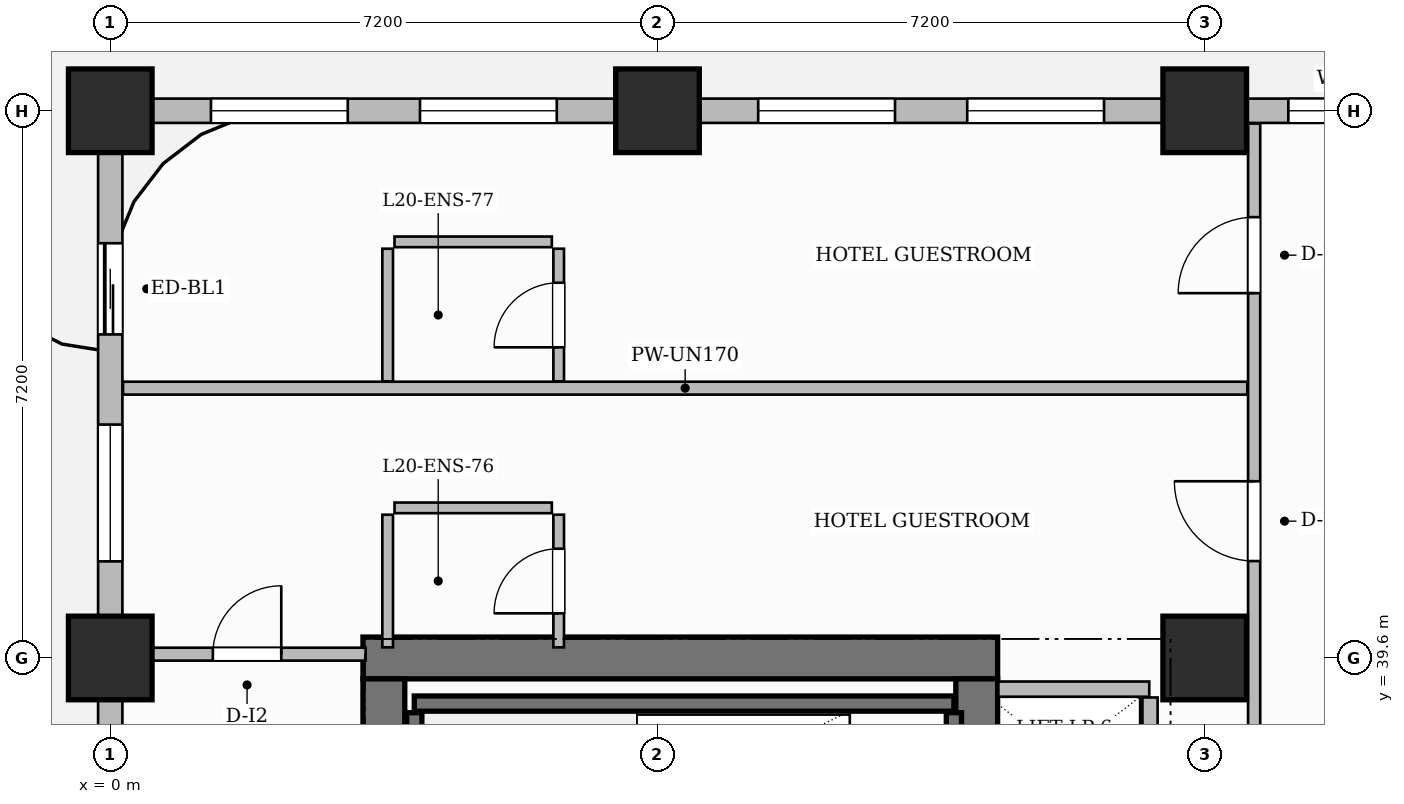
"""IFC4 building model, lengths in metres.
Left out: names, types, materials, properties, quantities, classifications, styles, units other than length and angle.
Written with IfcOpenShell. Run it as: python <this file> out.ifc"""

import sys

from ifc_helpers import new_model, si_unit, direction, frame, frame_2d, origin, origin_2d, place, context, subcontext, project, spatial, rectangle, extrude, source, transform, mapped, element, fill, save


model = new_model("IFC4")
c1 = context("Model", 3, precision=1e-05, world=origin(), true_north=direction((0.0, 1.0)))
c2 = subcontext(c1, "Body", "Model", "MODEL_VIEW")
j1 = project(units=[si_unit("LENGTHUNIT", "METRE"), si_unit("PLANEANGLEUNIT", "RADIAN")], contexts=[c1])
p1 = place(None, origin())
s1 = spatial("IfcSite", under=j1, at=p1, CompositionType="ELEMENT")
p2 = place(p1, origin())
s2 = spatial("IfcBuilding", under=s1, at=p2, CompositionType="ELEMENT")
p3 = place(p2, frame((0.0, 0.0, 84.2)))
s3 = spatial("IfcBuildingStorey", under=s2, at=p3, CompositionType="ELEMENT", Elevation=84.2)
p4 = place(p3, frame((3.325, 39.6, 0.0), z_axis=(0.0, 0.0, 1.0), x_axis=(1.0, 0.0, 0.0)))
e1 = element("IfcWall", 1, at=p4, inside=s3, PredefinedType="SHEAR", context=c2, shape_type="SweptSolid", body=[
    extrude(rectangle(XDim=8.35, YDim=0.55, at=frame_2d((4.175, 0.0))), origin(), (0.0, 0.0, 1.0), 3.7),
])
p5 = place(p3, frame((3.6, 25.475, 0.0), z_axis=(0.0, 0.0, 1.0), x_axis=(0.0, 1.0, 0.0)))
e2 = element("IfcWall", 2, at=p5, inside=s3, PredefinedType="SHEAR", context=c2, shape_type="SweptSolid", body=[
    extrude(rectangle(XDim=13.85, YDim=0.55, at=frame_2d((6.925, 0.0))), origin(), (0.0, 0.0, 1.0), 3.7),
])
p6 = place(p3, frame((11.4, 25.475, 0.0), z_axis=(0.0, 0.0, 1.0), x_axis=(0.0, 1.0, 0.0)))
e3 = element("IfcWall", 3, at=p6, inside=s3, PredefinedType="SHEAR", context=c2, shape_type="SweptSolid", body=[
    extrude(rectangle(XDim=13.85, YDim=0.55, at=frame_2d((6.925, 0.0))), origin(), (0.0, 0.0, 1.0), 3.7),
])
p7 = place(p6, frame((6.495, 0.0, 0.0)))
e4 = element("IfcOpeningElement", 4, at=p7, cuts=e3, PredefinedType="OPENING", context=c2, shape_type="SweptSolid", body=[
    extrude(rectangle(XDim=1.5, YDim=2.2, at=frame_2d((0.75, 1.1))), frame((0.0, 0.285, 0.0), z_axis=(0.0, -1.0, 0.0), x_axis=(1.0, 0.0, 0.0)), (0.0, 0.0, 1.0), 0.57),
])
m1 = source(origin(), c2, "Body", "SweptSolid", [
    extrude(rectangle(XDim=1.1, YDim=1.1, at=origin_2d()), origin(), (0.0, 0.0, 1.0), 3.7),
])
for number, where, z_axis, x_axis in (
    (5, (0.0, 39.6, 0.0), (0.0, 0.0, 1.0), (1.0, 0.0, 0.0)),
    (6, (0.0, 46.8, 0.0), (0.0, 0.0, 1.0), (1.0, 0.0, 0.0)),
    (7, (7.2, 46.8, 0.0), (0.0, 0.0, 1.0), (1.0, 0.0, 0.0)),
    (8, (14.4, 39.6, 0.0), (0.0, 0.0, 1.0), (1.0, 0.0, 0.0)),
    (9, (14.4, 46.8, 0.0), (0.0, 0.0, 1.0), (1.0, 0.0, 0.0)),
):
    element("IfcColumn", number, at=place(p3, frame(where, z_axis=z_axis, x_axis=x_axis)), inside=s3, PredefinedType="COLUMN", context=c2, shape_type="MappedRepresentation", body=[
        mapped(m1, transform((0.0, 0.0, 0.0), scale=1.0)),
    ])
p8 = place(p3, frame((4.0, 39.0, 0.0), z_axis=(0.0, 0.0, 1.0), x_axis=(1.0, 0.0, 0.0)))
e10 = element("IfcWall", 10, at=p8, inside=s3, PredefinedType="SHEAR", context=c2, shape_type="SweptSolid", body=[
    extrude(rectangle(XDim=7.1, YDim=0.2, at=frame_2d((3.55, 0.0))), origin(), (0.0, 0.0, 1.0), 3.7),
])
for number, where, z_axis, x_axis in (
    (11, (4.0, 36.18, 0.0), (0.0, 0.0, 1.0), (0.0, 1.0, 0.0)),
    (12, (11.1, 36.18, 0.0), (0.0, 0.0, 1.0), (0.0, 1.0, 0.0)),
):
    element("IfcWall", number, at=place(p3, frame(where, z_axis=z_axis, x_axis=x_axis)), inside=s3, PredefinedType="SHEAR", context=c2, shape_type="SweptSolid", body=[
        extrude(rectangle(XDim=2.7, YDim=0.2, at=frame_2d((1.35, 0.0))), origin(), (0.0, 0.0, 1.0), 3.7),
    ])
p9 = place(p3, frame((11.685, 39.19, 0.0), z_axis=(0.0, 0.0, 1.0), x_axis=(1.0, 0.0, 0.0)))
e13 = element("IfcWall", 13, at=p9, inside=s3, PredefinedType="PARTITIONING", context=c2, shape_type="SweptSolid", body=[
    extrude(rectangle(XDim=1.985, YDim=0.2, at=frame_2d((0.992, 0.0))), origin(), (0.0, 0.0, 1.0), 3.45),
])
p10 = place(p3, frame((13.68, 34.36, 0.0), z_axis=(0.0, 0.0, 1.0), x_axis=(0.0, 1.0, 0.0)))
e14 = element("IfcWall", 14, at=p10, inside=s3, PredefinedType="PARTITIONING", context=c2, shape_type="SweptSolid", body=[
    extrude(rectangle(XDim=4.72, YDim=0.2, at=frame_2d((2.36, 0.0))), origin(), (0.0, 0.0, 1.0), 3.45),
])
p11 = place(p3, frame((0.24, 39.65, 0.0), z_axis=(0.0, 0.0, 1.0), x_axis=(1.0, 0.0, 0.0)))
e15 = element("IfcWall", 15, at=p11, inside=s3, PredefinedType="PARTITIONING", context=c2, shape_type="SweptSolid", body=[
    extrude(rectangle(XDim=3.12, YDim=0.17, at=frame_2d((1.56, 0.0))), origin(), (0.0, 0.0, 1.0), 3.45),
])
p12 = place(p11, frame((1.11, 0.0, 0.0)))
e16 = element("IfcOpeningElement", 16, at=p12, cuts=e15, PredefinedType="OPENING", context=c2, shape_type="SweptSolid", body=[
    extrude(rectangle(XDim=0.9, YDim=2.15, at=frame_2d((0.45, 1.075))), frame((0.0, 0.095, 0.0), z_axis=(0.0, -1.0, 0.0), x_axis=(1.0, 0.0, 0.0)), (0.0, 0.0, 1.0), 0.19),
])
p13 = place(p3, frame((15.05, 34.34, 0.0), z_axis=(0.0, 0.0, 1.0), x_axis=(0.0, 1.0, 0.0)))
e17 = element("IfcWall", 17, at=p13, inside=s3, PredefinedType="PARTITIONING", context=c2, shape_type="SweptSolid", body=[
    extrude(rectangle(XDim=12.292, YDim=0.16, at=frame_2d((6.146, 0.0))), origin(), (0.0, 0.0, 1.0), 3.45),
])
p14 = place(p13, frame((6.535, 0.0, 0.0)))
e18 = element("IfcOpeningElement", 18, at=p14, cuts=e17, PredefinedType="OPENING", context=c2, shape_type="SweptSolid", body=[
    extrude(rectangle(XDim=1.05, YDim=2.25, at=frame_2d((0.525, 1.125))), frame((0.0, 0.09, 0.0), z_axis=(0.0, -1.0, 0.0), x_axis=(1.0, 0.0, 0.0)), (0.0, 0.0, 1.0), 0.18),
])
p15 = place(p13, frame((10.06, 0.0, 0.0)))
e19 = element("IfcOpeningElement", 19, at=p15, cuts=e17, PredefinedType="OPENING", context=c2, shape_type="SweptSolid", body=[
    extrude(rectangle(XDim=1.0, YDim=2.2, at=frame_2d((0.5, 1.1))), frame((0.0, 0.09, 0.0), z_axis=(0.0, -1.0, 0.0), x_axis=(1.0, 0.0, 0.0)), (0.0, 0.0, 1.0), 0.18),
])
p16 = place(p3, frame((0.168, 43.15, 0.0), z_axis=(0.0, 0.0, 1.0), x_axis=(1.0, 0.0, 0.0)))
e20 = element("IfcWall", 20, at=p16, inside=s3, PredefinedType="PARTITIONING", context=c2, shape_type="SweptSolid", body=[
    extrude(rectangle(XDim=14.792, YDim=0.17, at=frame_2d((7.396, 0.0))), origin(), (0.0, 0.0, 1.0), 3.45),
])
p17 = place(p3, frame((3.65, 39.74, 0.0), z_axis=(0.0, 0.0, 1.0), x_axis=(0.0, 1.0, 0.0)))
e21 = element("IfcWall", 21, at=p17, inside=s3, PredefinedType="PARTITIONING", context=c2, shape_type="SweptSolid", body=[
    extrude(rectangle(XDim=1.745, YDim=0.14, at=frame_2d((0.873, 0.0))), origin(), (0.0, 0.0, 1.0), 3.45),
])
p18 = place(p3, frame((3.74, 41.575, 0.0), z_axis=(0.0, 0.0, 1.0), x_axis=(1.0, 0.0, 0.0)))
e22 = element("IfcWall", 22, at=p18, inside=s3, PredefinedType="PARTITIONING", context=c2, shape_type="SweptSolid", body=[
    extrude(rectangle(XDim=2.07, YDim=0.14, at=frame_2d((1.035, 0.0))), origin(), (0.0, 0.0, 1.0), 2.885),
])
p19 = place(p3, frame((5.9, 39.74, 0.0), z_axis=(0.0, 0.0, 1.0), x_axis=(0.0, 1.0, 0.0)))
e23 = element("IfcWall", 23, at=p19, inside=s3, PredefinedType="PARTITIONING", context=c2, shape_type="SweptSolid", body=[
    extrude(rectangle(XDim=1.745, YDim=0.14, at=frame_2d((0.873, 0.0))), origin(), (0.0, 0.0, 1.0), 3.45),
])
p20 = place(p19, frame((0.448, 0.0, 0.0)))
e24 = element("IfcOpeningElement", 24, at=p20, cuts=e23, PredefinedType="OPENING", context=c2, shape_type="SweptSolid", body=[
    extrude(rectangle(XDim=0.85, YDim=2.1, at=frame_2d((0.425, 1.05))), frame((0.0, 0.08, 0.0), z_axis=(0.0, -1.0, 0.0), x_axis=(1.0, 0.0, 0.0)), (0.0, 0.0, 1.0), 0.16),
])
p21 = place(p3, frame((3.65, 43.24, 0.0), z_axis=(0.0, 0.0, 1.0), x_axis=(0.0, 1.0, 0.0)))
e25 = element("IfcWall", 25, at=p21, inside=s3, PredefinedType="PARTITIONING", context=c2, shape_type="SweptSolid", body=[
    extrude(rectangle(XDim=1.745, YDim=0.14, at=frame_2d((0.873, 0.0))), origin(), (0.0, 0.0, 1.0), 3.45),
])
p22 = place(p3, frame((3.74, 45.075, 0.0), z_axis=(0.0, 0.0, 1.0), x_axis=(1.0, 0.0, 0.0)))
e26 = element("IfcWall", 26, at=p22, inside=s3, PredefinedType="PARTITIONING", context=c2, shape_type="SweptSolid", body=[
    extrude(rectangle(XDim=2.07, YDim=0.14, at=frame_2d((1.035, 0.0))), origin(), (0.0, 0.0, 1.0), 3.45),
])
p23 = place(p3, frame((5.9, 43.24, 0.0), z_axis=(0.0, 0.0, 1.0), x_axis=(0.0, 1.0, 0.0)))
e27 = element("IfcWall", 27, at=p23, inside=s3, PredefinedType="PARTITIONING", context=c2, shape_type="SweptSolid", body=[
    extrude(rectangle(XDim=1.745, YDim=0.14, at=frame_2d((0.873, 0.0))), origin(), (0.0, 0.0, 1.0), 3.45),
])
p24 = place(p23, frame((0.448, 0.0, 0.0)))
e28 = element("IfcOpeningElement", 28, at=p24, cuts=e27, PredefinedType="OPENING", context=c2, shape_type="SweptSolid", body=[
    extrude(rectangle(XDim=0.85, YDim=2.1, at=frame_2d((0.425, 1.05))), frame((0.0, 0.08, 0.0), z_axis=(0.0, -1.0, 0.0), x_axis=(1.0, 0.0, 0.0)), (0.0, 0.0, 1.0), 0.16),
])
p25 = place(p3, frame((0.0, 25.25, 0.0), z_axis=(0.0, 0.0, 1.0), x_axis=(0.0, 1.0, 0.0)))
e29 = element("IfcWall", 29, at=p25, inside=s3, PredefinedType="SOLIDWALL", context=c2, shape_type="SweptSolid", body=[
    extrude(rectangle(XDim=21.5, YDim=0.32, at=frame_2d((10.75, 0.0))), origin(), (0.0, 0.0, 1.0), 2.885),
])
p26 = place(p25, frame((18.607, 0.0, 0.0)))
e30 = element("IfcOpeningElement", 30, at=p26, cuts=e29, PredefinedType="OPENING", context=c2, shape_type="SweptSolid", body=[
    extrude(rectangle(XDim=1.2, YDim=2.2, at=frame_2d((0.6, 1.1))), frame((0.0, 0.17, 0.0), z_axis=(0.0, -1.0, 0.0), x_axis=(1.0, 0.0, 0.0)), (0.0, 0.0, 1.0), 0.34),
])
p27 = place(p25, frame((0.8, 0.0, 0.0)))
e31 = element("IfcOpeningElement", 31, at=p27, cuts=e29, PredefinedType="OPENING", context=c2, shape_type="SweptSolid", body=[
    extrude(rectangle(XDim=1.2, YDim=2.2, at=frame_2d((0.6, 1.1))), frame((0.0, 0.17, 0.0), z_axis=(0.0, -1.0, 0.0), x_axis=(1.0, 0.0, 0.0)), (0.0, 0.0, 1.0), 0.34),
])
p28 = place(p25, frame((3.425, 0.0, 0.8)))
e32 = element("IfcOpeningElement", 32, at=p28, cuts=e29, PredefinedType="OPENING", context=c2, shape_type="SweptSolid", body=[
    extrude(rectangle(XDim=1.8, YDim=1.85, at=frame_2d((0.9, 0.925))), frame((0.0, 0.17, 0.0), z_axis=(0.0, -1.0, 0.0), x_axis=(1.0, 0.0, 0.0)), (0.0, 0.0, 1.0), 0.34),
])
p29 = place(p25, frame((8.475, 0.0, 0.8)))
e33 = element("IfcOpeningElement", 33, at=p29, cuts=e29, PredefinedType="OPENING", context=c2, shape_type="SweptSolid", body=[
    extrude(rectangle(XDim=1.8, YDim=1.85, at=frame_2d((0.9, 0.925))), frame((0.0, 0.17, 0.0), z_axis=(0.0, -1.0, 0.0), x_axis=(1.0, 0.0, 0.0)), (0.0, 0.0, 1.0), 0.34),
])
p30 = place(p25, frame((11.225, 0.0, 0.8)))
e34 = element("IfcOpeningElement", 34, at=p30, cuts=e29, PredefinedType="OPENING", context=c2, shape_type="SweptSolid", body=[
    extrude(rectangle(XDim=1.8, YDim=1.85, at=frame_2d((0.9, 0.925))), frame((0.0, 0.17, 0.0), z_axis=(0.0, -1.0, 0.0), x_axis=(1.0, 0.0, 0.0)), (0.0, 0.0, 1.0), 0.34),
])
p31 = place(p25, frame((15.621, 0.0, 0.8)))
e35 = element("IfcOpeningElement", 35, at=p31, cuts=e29, PredefinedType="OPENING", context=c2, shape_type="SweptSolid", body=[
    extrude(rectangle(XDim=1.8, YDim=1.85, at=frame_2d((0.9, 0.925))), frame((0.0, 0.17, 0.0), z_axis=(0.0, -1.0, 0.0), x_axis=(1.0, 0.0, 0.0)), (0.0, 0.0, 1.0), 0.34),
])
p32 = place(p3, frame((0.0, 46.8, 0.0), z_axis=(0.0, 0.0, 1.0), x_axis=(1.0, 0.0, 0.0)))
e36 = element("IfcWall", 36, at=p32, inside=s3, PredefinedType="SOLIDWALL", context=c2, shape_type="SweptSolid", body=[
    extrude(rectangle(XDim=18.0, YDim=0.32, at=frame_2d((9.0, 0.0))), origin(), (0.0, 0.0, 1.0), 2.885),
])
p33 = place(p32, frame((1.325, 0.0, 0.8)))
e37 = element("IfcOpeningElement", 37, at=p33, cuts=e36, PredefinedType="OPENING", context=c2, shape_type="SweptSolid", body=[
    extrude(rectangle(XDim=1.8, YDim=1.85, at=frame_2d((0.9, 0.925))), frame((0.0, 0.17, 0.0), z_axis=(0.0, -1.0, 0.0), x_axis=(1.0, 0.0, 0.0)), (0.0, 0.0, 1.0), 0.34),
])
p34 = place(p32, frame((4.075, 0.0, 0.8)))
e38 = element("IfcOpeningElement", 38, at=p34, cuts=e36, PredefinedType="OPENING", context=c2, shape_type="SweptSolid", body=[
    extrude(rectangle(XDim=1.8, YDim=1.85, at=frame_2d((0.9, 0.925))), frame((0.0, 0.17, 0.0), z_axis=(0.0, -1.0, 0.0), x_axis=(1.0, 0.0, 0.0)), (0.0, 0.0, 1.0), 0.34),
])
p35 = place(p32, frame((8.525, 0.0, 0.8)))
e39 = element("IfcOpeningElement", 39, at=p35, cuts=e36, PredefinedType="OPENING", context=c2, shape_type="SweptSolid", body=[
    extrude(rectangle(XDim=1.8, YDim=1.85, at=frame_2d((0.9, 0.925))), frame((0.0, 0.17, 0.0), z_axis=(0.0, -1.0, 0.0), x_axis=(1.0, 0.0, 0.0)), (0.0, 0.0, 1.0), 0.34),
])
p36 = place(p32, frame((11.275, 0.0, 0.8)))
e40 = element("IfcOpeningElement", 40, at=p36, cuts=e36, PredefinedType="OPENING", context=c2, shape_type="SweptSolid", body=[
    extrude(rectangle(XDim=1.8, YDim=1.85, at=frame_2d((0.9, 0.925))), frame((0.0, 0.17, 0.0), z_axis=(0.0, -1.0, 0.0), x_axis=(1.0, 0.0, 0.0)), (0.0, 0.0, 1.0), 0.34),
])
p37 = place(p32, frame((15.5, 0.0, 0.8)))
e41 = element("IfcOpeningElement", 41, at=p37, cuts=e36, PredefinedType="OPENING", context=c2, shape_type="SweptSolid", body=[
    extrude(rectangle(XDim=1.4, YDim=1.85, at=frame_2d((0.7, 0.925))), frame((0.0, 0.17, 0.0), z_axis=(0.0, -1.0, 0.0), x_axis=(1.0, 0.0, 0.0)), (0.0, 0.0, 1.0), 0.34),
])
m2 = source(origin(), c2, "Body", "SweptSolid", [
    extrude(rectangle(XDim=0.9, YDim=2.15, at=frame_2d((0.45, 1.075))), frame((0.0, 0.025, 0.0), z_axis=(0.0, -1.0, 0.0), x_axis=(1.0, 0.0, 0.0)), (0.0, 0.0, 1.0), 0.05),
])
p38 = place(p12, origin())
e42 = element("IfcDoor", 42, at=p38, inside=s3, OperationType="SINGLE_SWING_RIGHT", PredefinedType="DOOR", context=c2, shape_type="MappedRepresentation", body=[
    mapped(m2, transform((0.0, 0.0, 0.0), scale=1.0)),
])
fill(e16, e42)
m3 = source(origin(), c2, "Body", "SweptSolid", [
    extrude(rectangle(XDim=0.85, YDim=2.1, at=frame_2d((0.425, 1.05))), frame((0.0, 0.025, 0.0), z_axis=(0.0, -1.0, 0.0), x_axis=(1.0, 0.0, 0.0)), (0.0, 0.0, 1.0), 0.05),
])
p39 = place(p20, origin())
e43 = element("IfcDoor", 43, at=p39, inside=s3, OperationType="SINGLE_SWING_LEFT", PredefinedType="DOOR", context=c2, shape_type="MappedRepresentation", body=[
    mapped(m3, transform((0.0, 0.0, 0.0), scale=1.0)),
])
fill(e24, e43)
m4 = source(origin(), c2, "Body", "SweptSolid", [
    extrude(rectangle(XDim=1.05, YDim=2.25, at=frame_2d((0.525, 1.125))), frame((0.0, 0.025, 0.0), z_axis=(0.0, -1.0, 0.0), x_axis=(1.0, 0.0, 0.0)), (0.0, 0.0, 1.0), 0.05),
])
p40 = place(p14, origin())
e44 = element("IfcDoor", 44, at=p40, inside=s3, OperationType="SINGLE_SWING_RIGHT", PredefinedType="DOOR", context=c2, shape_type="MappedRepresentation", body=[
    mapped(m4, transform((0.0, 0.0, 0.0), scale=1.0)),
])
fill(e18, e44)
p41 = place(p24, origin())
e45 = element("IfcDoor", 45, at=p41, inside=s3, OperationType="SINGLE_SWING_LEFT", PredefinedType="DOOR", context=c2, shape_type="MappedRepresentation", body=[
    mapped(m3, transform((0.0, 0.0, 0.0), scale=1.0)),
])
fill(e28, e45)
m5 = source(origin(), c2, "Body", "SweptSolid", [
    extrude(rectangle(XDim=1.0, YDim=2.2, at=frame_2d((0.5, 1.1))), frame((0.0, 0.025, 0.0), z_axis=(0.0, -1.0, 0.0), x_axis=(1.0, 0.0, 0.0)), (0.0, 0.0, 1.0), 0.05),
])
p42 = place(p15, origin())
e46 = element("IfcDoor", 46, at=p42, inside=s3, OperationType="SINGLE_SWING_LEFT", PredefinedType="DOOR", context=c2, shape_type="MappedRepresentation", body=[
    mapped(m5, transform((0.0, 0.0, 0.0), scale=1.0)),
])
fill(e19, e46)
m6 = source(origin(), c2, "Body", "SweptSolid", [
    extrude(rectangle(XDim=1.2, YDim=2.2, at=frame_2d((0.6, 1.1))), frame((0.0, 0.025, 0.0), z_axis=(0.0, -1.0, 0.0), x_axis=(1.0, 0.0, 0.0)), (0.0, 0.0, 1.0), 0.05),
])
p43 = place(p26, origin())
e47 = element("IfcDoor", 47, at=p43, inside=s3, OperationType="SLIDING_TO_LEFT", PredefinedType="DOOR", context=c2, shape_type="MappedRepresentation", body=[
    mapped(m6, transform((0.0, 0.0, 0.0), scale=1.0)),
])
fill(e30, e47)
m7 = source(origin(), c2, "Body", "SweptSolid", [
    extrude(rectangle(XDim=1.8, YDim=1.85, at=frame_2d((0.9, 0.925))), frame((0.0, 0.03, 0.0), z_axis=(0.0, -1.0, 0.0), x_axis=(1.0, 0.0, 0.0)), (0.0, 0.0, 1.0), 0.06),
])
p44 = place(p31, origin())
e48 = element("IfcWindow", 48, at=p44, inside=s3, PartitioningType="DOUBLE_PANEL_VERTICAL", PredefinedType="WINDOW", context=c2, shape_type="MappedRepresentation", body=[
    mapped(m7, transform((0.0, 0.0, 0.0), scale=1.0)),
])
fill(e35, e48)
p45 = place(p33, origin())
e49 = element("IfcWindow", 49, at=p45, inside=s3, PartitioningType="DOUBLE_PANEL_VERTICAL", PredefinedType="WINDOW", context=c2, shape_type="MappedRepresentation", body=[
    mapped(m7, transform((0.0, 0.0, 0.0), scale=1.0)),
])
fill(e37, e49)
p46 = place(p34, origin())
e50 = element("IfcWindow", 50, at=p46, inside=s3, PartitioningType="DOUBLE_PANEL_VERTICAL", PredefinedType="WINDOW", context=c2, shape_type="MappedRepresentation", body=[
    mapped(m7, transform((0.0, 0.0, 0.0), scale=1.0)),
])
fill(e38, e50)
p47 = place(p35, origin())
e51 = element("IfcWindow", 51, at=p47, inside=s3, PartitioningType="DOUBLE_PANEL_VERTICAL", PredefinedType="WINDOW", context=c2, shape_type="MappedRepresentation", body=[
    mapped(m7, transform((0.0, 0.0, 0.0), scale=1.0)),
])
fill(e39, e51)
p48 = place(p36, origin())
e52 = element("IfcWindow", 52, at=p48, inside=s3, PartitioningType="DOUBLE_PANEL_VERTICAL", PredefinedType="WINDOW", context=c2, shape_type="MappedRepresentation", body=[
    mapped(m7, transform((0.0, 0.0, 0.0), scale=1.0)),
])
fill(e40, e52)
m8 = source(origin(), c2, "Body", "SweptSolid", [
    extrude(rectangle(XDim=1.4, YDim=1.85, at=frame_2d((0.7, 0.925))), frame((0.0, 0.03, 0.0), z_axis=(0.0, -1.0, 0.0), x_axis=(1.0, 0.0, 0.0)), (0.0, 0.0, 1.0), 0.06),
])
p49 = place(p37, origin())
e53 = element("IfcWindow", 53, at=p49, inside=s3, PartitioningType="SINGLE_PANEL", PredefinedType="WINDOW", context=c2, shape_type="MappedRepresentation", body=[
    mapped(m8, transform((0.0, 0.0, 0.0), scale=1.0)),
])
fill(e41, e53)
save(model, sys.argv[1])
